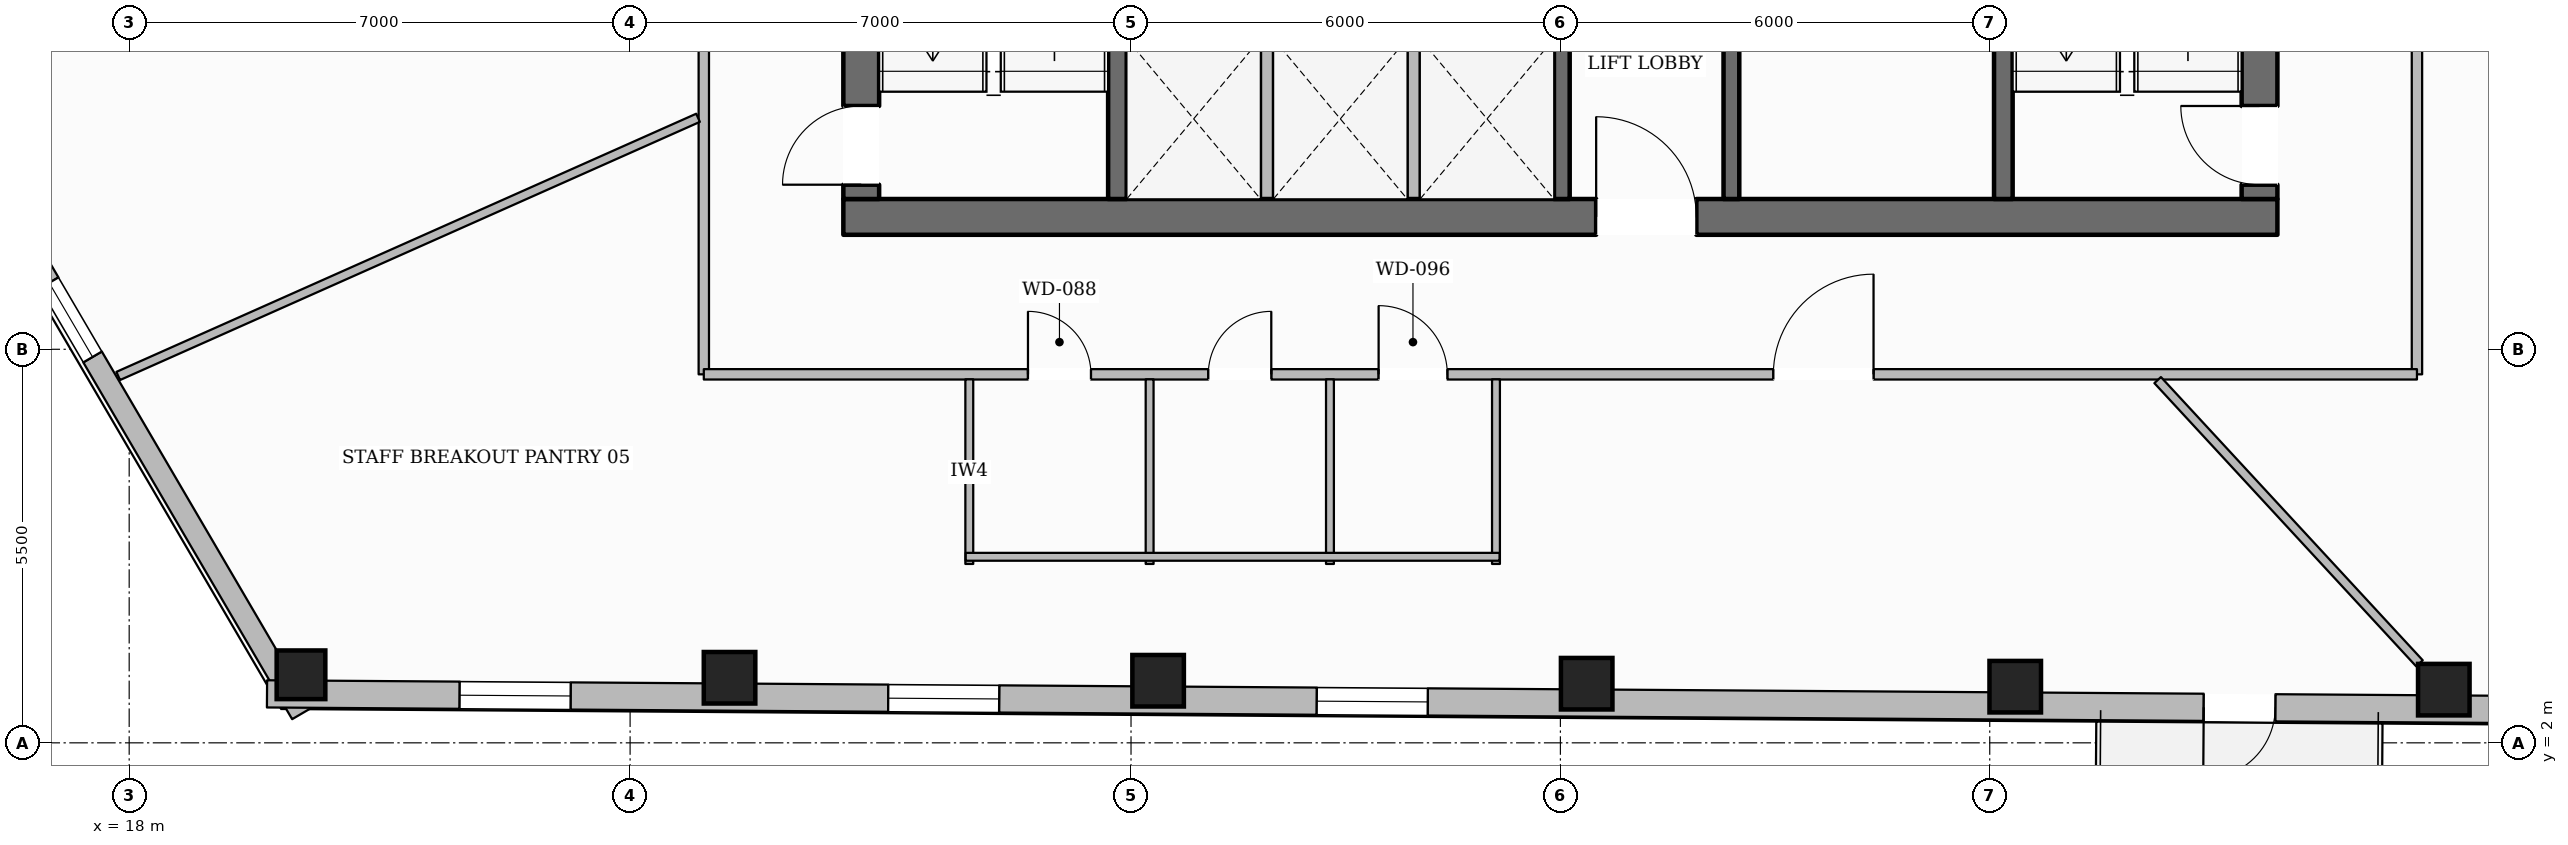
"""IFC4 building model, lengths in metres.
Left out: names, types, materials, properties, quantities, classifications, styles, units other than length and angle.
Written with IfcOpenShell. Run it as: python <this file> out.ifc"""

import sys

from ifc_helpers import new_model, si_unit, direction, frame, frame_2d, origin, origin_2d, place, context, subcontext, project, spatial, rectangle, hollow_rectangle, extrude, element, fill, save


model = new_model("IFC4")
c1 = context("Model", 3, precision=1e-05, world=origin(), true_north=direction((0.0, 1.0)))
c2 = subcontext(c1, "Body", "Model", "MODEL_VIEW")
j1 = project(units=[si_unit("LENGTHUNIT", "METRE"), si_unit("PLANEANGLEUNIT", "RADIAN")], contexts=[c1])
p1 = place(None, origin())
s1 = spatial("IfcSite", under=j1, at=p1, CompositionType="ELEMENT")
p2 = place(p1, origin())
s2 = spatial("IfcBuilding", under=s1, at=p2, CompositionType="ELEMENT")
p3 = place(p2, frame((0.0, 0.0, 120.15)))
s3 = spatial("IfcBuildingStorey", under=s2, at=p3, CompositionType="ELEMENT", Elevation=120.15)
p4 = place(p3, frame((27.98, 9.35, 0.0), z_axis=(0.0, 0.0, 1.0), x_axis=(1.0, 0.0, 0.0)))
e1 = element("IfcWall", 1, at=p4, inside=s3, PredefinedType="SOLIDWALL", context=c2, shape_type="SweptSolid", body=[
    extrude(rectangle(XDim=20.04, YDim=0.5, at=frame_2d((10.02, 0.0))), origin(), (0.0, 0.0, 1.0), 3.6),
])
p5 = place(p4, frame((10.52, 0.0, 0.0)))
e2 = element("IfcOpeningElement", 2, at=p5, cuts=e1, PredefinedType="OPENING", context=c2, shape_type="SweptSolid", body=[
    extrude(rectangle(XDim=1.4, YDim=2.2, at=frame_2d((0.7, 1.1))), frame((0.0, 0.26, 0.0), z_axis=(0.0, -1.0, 0.0), x_axis=(1.0, 0.0, 0.0)), (0.0, 0.0, 1.0), 0.52),
])
p6 = place(p3, frame((28.23, 9.6, 0.0), z_axis=(0.0, 0.0, 1.0), x_axis=(0.0, 1.0, 0.0)))
e3 = element("IfcWall", 3, at=p6, inside=s3, PredefinedType="SOLIDWALL", context=c2, shape_type="SweptSolid", body=[
    extrude(rectangle(XDim=13.0, YDim=0.5, at=frame_2d((6.5, 0.0))), origin(), (0.0, 0.0, 1.0), 3.6),
])
p7 = place(p6, frame((0.2, 0.0, 0.0)))
e4 = element("IfcOpeningElement", 4, at=p7, cuts=e3, PredefinedType="OPENING", context=c2, shape_type="SweptSolid", body=[
    extrude(rectangle(XDim=1.1, YDim=2.15, at=frame_2d((0.55, 1.075))), frame((0.0, 0.26, 0.0), z_axis=(0.0, -1.0, 0.0), x_axis=(1.0, 0.0, 0.0)), (0.0, 0.0, 1.0), 0.52),
])
p8 = place(p6, frame((8.4, 0.0, 0.0)))
e5 = element("IfcOpeningElement", 5, at=p8, cuts=e3, PredefinedType="OPENING", context=c2, shape_type="SweptSolid", body=[
    extrude(rectangle(XDim=0.9, YDim=2.1, at=frame_2d((0.45, 1.05))), frame((0.0, 0.26, 0.0), z_axis=(0.0, -1.0, 0.0), x_axis=(1.0, 0.0, 0.0)), (0.0, 0.0, 1.0), 0.52),
])
p9 = place(p3, frame((47.77, 9.6, 0.0), z_axis=(0.0, 0.0, 1.0), x_axis=(0.0, 1.0, 0.0)))
e6 = element("IfcWall", 6, at=p9, inside=s3, PredefinedType="SOLIDWALL", context=c2, shape_type="SweptSolid", body=[
    extrude(rectangle(XDim=13.0, YDim=0.5, at=frame_2d((6.5, 0.0))), origin(), (0.0, 0.0, 1.0), 3.6),
])
p10 = place(p9, frame((0.2, 0.0, 0.0)))
e7 = element("IfcOpeningElement", 7, at=p10, cuts=e6, PredefinedType="OPENING", context=c2, shape_type="SweptSolid", body=[
    extrude(rectangle(XDim=1.1, YDim=2.15, at=frame_2d((0.55, 1.075))), frame((0.0, 0.26, 0.0), z_axis=(0.0, -1.0, 0.0), x_axis=(1.0, 0.0, 0.0)), (0.0, 0.0, 1.0), 0.52),
])
p11 = place(p9, frame((8.4, 0.0, 0.0)))
e8 = element("IfcOpeningElement", 8, at=p11, cuts=e6, PredefinedType="OPENING", context=c2, shape_type="SweptSolid", body=[
    extrude(rectangle(XDim=0.9, YDim=2.1, at=frame_2d((0.45, 1.05))), frame((0.0, 0.26, 0.0), z_axis=(0.0, -1.0, 0.0), x_axis=(1.0, 0.0, 0.0)), (0.0, 0.0, 1.0), 0.52),
])
p12 = place(p3, frame((31.81, 9.6, 0.0), z_axis=(0.0, 0.0, 1.0), x_axis=(0.0, 1.0, 0.0)))
e9 = element("IfcWall", 9, at=p12, inside=s3, PredefinedType="SHEAR", context=c2, shape_type="SweptSolid", body=[
    extrude(rectangle(XDim=13.0, YDim=0.26, at=frame_2d((6.5, 0.0))), origin(), (0.0, 0.0, 1.0), 3.6),
])
p13 = place(p12, frame((10.925, 0.0, 0.0)))
e10 = element("IfcOpeningElement", 10, at=p13, cuts=e9, PredefinedType="OPENING", context=c2, shape_type="SweptSolid", body=[
    extrude(rectangle(XDim=1.25, YDim=2.25, at=frame_2d((0.625, 1.125))), frame((0.0, 0.14, 0.0), z_axis=(0.0, -1.0, 0.0), x_axis=(1.0, 0.0, 0.0)), (0.0, 0.0, 1.0), 0.28),
])
p14 = place(p3, frame((44.19, 9.6, 0.0), z_axis=(0.0, 0.0, 1.0), x_axis=(0.0, 1.0, 0.0)))
e11 = element("IfcWall", 11, at=p14, inside=s3, PredefinedType="SHEAR", context=c2, shape_type="SweptSolid", body=[
    extrude(rectangle(XDim=13.0, YDim=0.26, at=frame_2d((6.5, 0.0))), origin(), (0.0, 0.0, 1.0), 3.6),
])
p15 = place(p14, frame((10.925, 0.0, 0.0)))
e12 = element("IfcOpeningElement", 12, at=p15, cuts=e11, PredefinedType="OPENING", context=c2, shape_type="SweptSolid", body=[
    extrude(rectangle(XDim=1.25, YDim=2.25, at=frame_2d((0.625, 1.125))), frame((0.0, 0.14, 0.0), z_axis=(0.0, -1.0, 0.0), x_axis=(1.0, 0.0, 0.0)), (0.0, 0.0, 1.0), 0.28),
])
for number, where, z_axis, x_axis in (
    (13, (38.02, 9.6, 0.0), (0.0, 0.0, 1.0), (0.0, 1.0, 0.0)),
    (14, (40.39, 9.6, 0.0), (0.0, 0.0, 1.0), (0.0, 1.0, 0.0)),
):
    element("IfcWall", number, at=place(p3, frame(where, z_axis=z_axis, x_axis=x_axis)), inside=s3, PredefinedType="SOLIDWALL", context=c2, shape_type="SweptSolid", body=[
        extrude(rectangle(XDim=2.24, YDim=0.22, at=frame_2d((1.12, 0.0))), origin(), (0.0, 0.0, 1.0), 3.6),
    ])
p16 = place(p3, frame((20.401, 2.951, 0.0), z_axis=(0.0, 0.0, 1.0), x_axis=(1.0, 0.0, 0.0)))
e15 = element("IfcColumn", 15, at=p16, inside=s3, PredefinedType="COLUMN", context=c2, shape_type="SweptSolid", body=[
    extrude(hollow_rectangle(XDim=0.68, YDim=0.68, WallThickness=0.03, at=origin_2d()), origin(), (0.0, 0.0, 1.0), 3.6),
])
for number, where, z_axis, x_axis in (
    (16, (26.39, 2.909, 0.0), (0.0, 0.0, 1.0), (1.0, 0.0, 0.0)),
    (17, (32.379, 2.868, 0.0), (0.0, 0.0, 1.0), (1.0, 0.0, 0.0)),
    (18, (38.367, 2.826, 0.0), (0.0, 0.0, 1.0), (1.0, 0.0, 0.0)),
    (19, (44.356, 2.785, 0.0), (0.0, 0.0, 1.0), (1.0, 0.0, 0.0)),
    (20, (50.345, 2.743, 0.0), (0.0, 0.0, 1.0), (1.0, 0.0, 0.0)),
):
    element("IfcColumn", number, at=place(p3, frame(where, z_axis=z_axis, x_axis=x_axis)), inside=s3, PredefinedType="COLUMN", context=c2, shape_type="SweptSolid", body=[
        extrude(hollow_rectangle(XDim=0.72, YDim=0.72, WallThickness=0.032, at=origin_2d()), origin(), (0.0, 0.0, 1.0), 3.6),
    ])
p17 = place(p3, frame((20.407, 2.406, 0.0), z_axis=(0.0, 0.0, 1.0), x_axis=(-0.505148604042, 0.863032379366, 0.0)))
e21 = element("IfcWall", 21, at=p17, inside=s3, PredefinedType="STANDARD", context=c2, shape_type="SweptSolid", body=[
    extrude(rectangle(XDim=12.755, YDim=0.3, at=frame_2d((6.378, 0.0))), origin(), (0.0, 0.0, 1.0), 3.059),
])
p18 = place(p17, frame((5.778, 0.0, 0.65)))
e22 = element("IfcOpeningElement", 22, at=p18, cuts=e21, PredefinedType="OPENING", context=c2, shape_type="SweptSolid", body=[
    extrude(rectangle(XDim=1.2, YDim=1.7, at=frame_2d((0.6, 0.85))), frame((0.0, 0.16, 0.0), z_axis=(0.0, -1.0, 0.0), x_axis=(1.0, 0.0, 0.0)), (0.0, 0.0, 1.0), 0.32),
])
p19 = place(p3, frame((56.812, 2.428, 0.0), z_axis=(0.0, 0.0, 1.0), x_axis=(-0.999975943084, 0.006936371743, 0.0)))
e23 = element("IfcWall", 23, at=p19, inside=s3, PredefinedType="STANDARD", context=c2, shape_type="SweptSolid", body=[
    extrude(rectangle(XDim=36.887, YDim=0.38, at=frame_2d((18.443, 0.0))), origin(), (0.0, 0.0, 1.0), 3.059),
])
p20 = place(p19, frame((8.822, 0.0, 0.0)))
e24 = element("IfcOpeningElement", 24, at=p20, cuts=e23, PredefinedType="OPENING", context=c2, shape_type="SweptSolid", body=[
    extrude(rectangle(XDim=1.0, YDim=2.2, at=frame_2d((0.5, 1.1))), frame((0.0, 0.2, 0.0), z_axis=(0.0, -1.0, 0.0), x_axis=(1.0, 0.0, 0.0)), (0.0, 0.0, 1.0), 0.4),
])
p21 = place(p19, frame((32.644, 0.0, 0.65)))
e25 = element("IfcOpeningElement", 25, at=p21, cuts=e23, PredefinedType="OPENING", context=c2, shape_type="SweptSolid", body=[
    extrude(rectangle(XDim=1.55, YDim=1.75, at=frame_2d((0.775, 0.875))), frame((0.0, 0.2, 0.0), z_axis=(0.0, -1.0, 0.0), x_axis=(1.0, 0.0, 0.0)), (0.0, 0.0, 1.0), 0.4),
])
p22 = place(p19, frame((26.655, 0.0, 0.65)))
e26 = element("IfcOpeningElement", 26, at=p22, cuts=e23, PredefinedType="OPENING", context=c2, shape_type="SweptSolid", body=[
    extrude(rectangle(XDim=1.55, YDim=1.75, at=frame_2d((0.775, 0.875))), frame((0.0, 0.2, 0.0), z_axis=(0.0, -1.0, 0.0), x_axis=(1.0, 0.0, 0.0)), (0.0, 0.0, 1.0), 0.4),
])
p23 = place(p19, frame((20.666, 0.0, 0.65)))
e27 = element("IfcOpeningElement", 27, at=p23, cuts=e23, PredefinedType="OPENING", context=c2, shape_type="SweptSolid", body=[
    extrude(rectangle(XDim=1.55, YDim=1.75, at=frame_2d((0.775, 0.875))), frame((0.0, 0.2, 0.0), z_axis=(0.0, -1.0, 0.0), x_axis=(1.0, 0.0, 0.0)), (0.0, 0.0, 1.0), 0.4),
])
p24 = place(p19, frame((2.699, 0.0, 0.65)))
e28 = element("IfcOpeningElement", 28, at=p24, cuts=e23, PredefinedType="OPENING", context=c2, shape_type="SweptSolid", body=[
    extrude(rectangle(XDim=1.55, YDim=1.75, at=frame_2d((0.775, 0.875))), frame((0.0, 0.2, 0.0), z_axis=(0.0, -1.0, 0.0), x_axis=(1.0, 0.0, 0.0)), (0.0, 0.0, 1.0), 0.4),
])
for number, where, z_axis, x_axis in (
    (29, (33.9, 9.55, 0.0), (0.0, 0.0, 1.0), (0.0, 1.0, 0.0)),
    (30, (35.95, 9.55, 0.0), (0.0, 0.0, 1.0), (0.0, 1.0, 0.0)),
):
    element("IfcWall", number, at=place(p3, frame(where, z_axis=z_axis, x_axis=x_axis)), inside=s3, PredefinedType="PARTITIONING", context=c2, shape_type="SweptSolid", body=[
        extrude(rectangle(XDim=2.29, YDim=0.165, at=frame_2d((1.145, 0.0))), origin(), (0.0, 0.0, 1.0), 3.6),
    ])
p25 = place(p3, frame((49.97, 7.15, 0.0), z_axis=(0.0, 0.0, 1.0), x_axis=(0.0, 1.0, 0.0)))
e31 = element("IfcWall", 31, at=p25, inside=s3, PredefinedType="PARTITIONING", context=c2, shape_type="SweptSolid", body=[
    extrude(rectangle(XDim=17.9, YDim=0.145, at=frame_2d((8.95, 0.0))), origin(), (0.0, 0.0, 1.0), 3.288),
])
p26 = place(p25, frame((6.208, 0.0, 0.0)))
e32 = element("IfcOpeningElement", 32, at=p26, cuts=e31, PredefinedType="OPENING", context=c2, shape_type="SweptSolid", body=[
    extrude(rectangle(XDim=1.4, YDim=2.2, at=frame_2d((0.7, 1.1))), frame((0.0, 0.083, 0.0), z_axis=(0.0, -1.0, 0.0), x_axis=(1.0, 0.0, 0.0)), (0.0, 0.0, 1.0), 0.165),
])
p27 = place(p3, frame((26.03, 25.05, 0.0), z_axis=(0.0, 0.0, 1.0), x_axis=(0.0, -1.0, 0.0)))
e33 = element("IfcWall", 33, at=p27, inside=s3, PredefinedType="PARTITIONING", context=c2, shape_type="SweptSolid", body=[
    extrude(rectangle(XDim=17.9, YDim=0.145, at=frame_2d((8.95, 0.0))), origin(), (0.0, 0.0, 1.0), 3.288),
])
p28 = place(p27, frame((8.438, 0.0, 0.0)))
e34 = element("IfcOpeningElement", 34, at=p28, cuts=e33, PredefinedType="OPENING", context=c2, shape_type="SweptSolid", body=[
    extrude(rectangle(XDim=1.4, YDim=2.2, at=frame_2d((0.7, 1.1))), frame((0.0, 0.083, 0.0), z_axis=(0.0, -1.0, 0.0), x_axis=(1.0, 0.0, 0.0)), (0.0, 0.0, 1.0), 0.165),
])
p29 = place(p3, frame((26.03, 7.15, 0.0), z_axis=(0.0, 0.0, 1.0), x_axis=(1.0, 0.0, 0.0)))
e35 = element("IfcWall", 35, at=p29, inside=s3, PredefinedType="PARTITIONING", context=c2, shape_type="SweptSolid", body=[
    extrude(rectangle(XDim=23.94, YDim=0.145, at=frame_2d((11.97, 0.0))), origin(), (0.0, 0.0, 1.0), 3.6),
])
p30 = place(p29, frame((4.53, 0.0, 0.0)))
e36 = element("IfcOpeningElement", 36, at=p30, cuts=e35, PredefinedType="OPENING", context=c2, shape_type="SweptSolid", body=[
    extrude(rectangle(XDim=0.88, YDim=2.1, at=frame_2d((0.44, 1.05))), frame((0.0, 0.083, 0.0), z_axis=(0.0, -1.0, 0.0), x_axis=(1.0, 0.0, 0.0)), (0.0, 0.0, 1.0), 0.165),
])
p31 = place(p29, frame((7.05, 0.0, 0.0)))
e37 = element("IfcOpeningElement", 37, at=p31, cuts=e35, PredefinedType="OPENING", context=c2, shape_type="SweptSolid", body=[
    extrude(rectangle(XDim=0.88, YDim=2.1, at=frame_2d((0.44, 1.05))), frame((0.0, 0.083, 0.0), z_axis=(0.0, -1.0, 0.0), x_axis=(1.0, 0.0, 0.0)), (0.0, 0.0, 1.0), 0.165),
])
p32 = place(p29, frame((9.43, 0.0, 0.0)))
e38 = element("IfcOpeningElement", 38, at=p32, cuts=e35, PredefinedType="OPENING", context=c2, shape_type="SweptSolid", body=[
    extrude(rectangle(XDim=0.96, YDim=2.1, at=frame_2d((0.48, 1.05))), frame((0.0, 0.083, 0.0), z_axis=(0.0, -1.0, 0.0), x_axis=(1.0, 0.0, 0.0)), (0.0, 0.0, 1.0), 0.165),
])
p33 = place(p29, frame((14.946, 0.0, 0.0)))
e39 = element("IfcOpeningElement", 39, at=p33, cuts=e35, PredefinedType="OPENING", context=c2, shape_type="SweptSolid", body=[
    extrude(rectangle(XDim=1.4, YDim=2.2, at=frame_2d((0.7, 1.1))), frame((0.0, 0.083, 0.0), z_axis=(0.0, -1.0, 0.0), x_axis=(1.0, 0.0, 0.0)), (0.0, 0.0, 1.0), 0.165),
])
p34 = place(p3, frame((29.74, 4.5, 0.0), z_axis=(0.0, 0.0, 1.0), x_axis=(0.0, 1.0, 0.0)))
e40 = element("IfcWall", 40, at=p34, inside=s3, PredefinedType="PLUMBINGWALL", context=c2, shape_type="SweptSolid", body=[
    extrude(rectangle(XDim=2.58, YDim=0.11, at=frame_2d((1.29, 0.0))), origin(), (0.0, 0.0, 1.0), 3.6),
])
p35 = place(p3, frame((32.26, 4.5, 0.0), z_axis=(0.0, 0.0, 1.0), x_axis=(0.0, 1.0, 0.0)))
e41 = element("IfcWall", 41, at=p35, inside=s3, PredefinedType="PLUMBINGWALL", context=c2, shape_type="SweptSolid", body=[
    extrude(rectangle(XDim=2.58, YDim=0.11, at=frame_2d((1.29, 0.0))), origin(), (0.0, 0.0, 1.0), 3.141),
])
for number, where, z_axis, x_axis in (
    (42, (34.78, 4.5, 0.0), (0.0, 0.0, 1.0), (0.0, 1.0, 0.0)),
    (43, (37.1, 4.5, 0.0), (0.0, 0.0, 1.0), (0.0, 1.0, 0.0)),
):
    element("IfcWall", number, at=place(p3, frame(where, z_axis=z_axis, x_axis=x_axis)), inside=s3, PredefinedType="PLUMBINGWALL", context=c2, shape_type="SweptSolid", body=[
        extrude(rectangle(XDim=2.58, YDim=0.11, at=frame_2d((1.29, 0.0))), origin(), (0.0, 0.0, 1.0), 3.6),
    ])
p36 = place(p3, frame((29.69, 4.6, 0.0), z_axis=(0.0, 0.0, 1.0), x_axis=(1.0, 0.0, 0.0)))
e44 = element("IfcWall", 44, at=p36, inside=s3, PredefinedType="PLUMBINGWALL", context=c2, shape_type="SweptSolid", body=[
    extrude(rectangle(XDim=7.46, YDim=0.11, at=frame_2d((3.73, 0.0))), origin(), (0.0, 0.0, 1.0), 3.6),
])
p37 = place(p3, frame((25.949, 10.735, 0.0), z_axis=(0.0, 0.0, 1.0), x_axis=(-0.913542336497, -0.406743653211, 0.0)))
e45 = element("IfcWall", 45, at=p37, inside=s3, PredefinedType="PARTITIONING", context=c2, shape_type="SweptSolid", body=[
    extrude(rectangle(XDim=8.87, YDim=0.125, at=frame_2d((4.435, 0.0))), origin(), (0.0, 0.0, 1.0), 3.6),
])
p38 = place(p3, frame((46.347, 7.07, 0.0), z_axis=(0.0, 0.0, 1.0), x_axis=(0.678748401089, -0.734370892683, 0.0)))
e46 = element("IfcWall", 46, at=p38, inside=s3, PredefinedType="PARTITIONING", context=c2, shape_type="SweptSolid", body=[
    extrude(rectangle(XDim=5.39, YDim=0.125, at=frame_2d((2.695, 0.0))), origin(), (0.0, 0.0, 1.0), 3.6),
])
p39 = place(p20, origin())
e47 = element("IfcDoor", 47, at=p39, inside=s3, OperationType="SINGLE_SWING_RIGHT", PredefinedType="DOOR", context=c2, shape_type="SweptSolid", body=[
    extrude(rectangle(XDim=1.0, YDim=2.2, at=frame_2d((0.5, 1.1))), frame((0.0, 0.025, 0.0), z_axis=(0.0, -1.0, 0.0), x_axis=(1.0, 0.0, 0.0)), (0.0, 0.0, 1.0), 0.05),
])
fill(e24, e47)
p40 = place(p21, origin())
e48 = element("IfcWindow", 48, at=p40, inside=s3, PartitioningType="SINGLE_PANEL", PredefinedType="WINDOW", context=c2, shape_type="SweptSolid", body=[
    extrude(rectangle(XDim=1.55, YDim=1.75, at=frame_2d((0.775, 0.875))), frame((0.0, 0.03, 0.0), z_axis=(0.0, -1.0, 0.0), x_axis=(1.0, 0.0, 0.0)), (0.0, 0.0, 1.0), 0.06),
])
fill(e25, e48)
p41 = place(p22, origin())
e49 = element("IfcWindow", 49, at=p41, inside=s3, PartitioningType="SINGLE_PANEL", PredefinedType="WINDOW", context=c2, shape_type="SweptSolid", body=[
    extrude(rectangle(XDim=1.55, YDim=1.75, at=frame_2d((0.775, 0.875))), frame((0.0, 0.03, 0.0), z_axis=(0.0, -1.0, 0.0), x_axis=(1.0, 0.0, 0.0)), (0.0, 0.0, 1.0), 0.06),
])
fill(e26, e49)
p42 = place(p23, origin())
e50 = element("IfcWindow", 50, at=p42, inside=s3, PartitioningType="SINGLE_PANEL", PredefinedType="WINDOW", context=c2, shape_type="SweptSolid", body=[
    extrude(rectangle(XDim=1.55, YDim=1.75, at=frame_2d((0.775, 0.875))), frame((0.0, 0.03, 0.0), z_axis=(0.0, -1.0, 0.0), x_axis=(1.0, 0.0, 0.0)), (0.0, 0.0, 1.0), 0.06),
])
fill(e27, e50)
p43 = place(p18, origin())
e51 = element("IfcWindow", 51, at=p43, inside=s3, PartitioningType="SINGLE_PANEL", PredefinedType="WINDOW", context=c2, shape_type="SweptSolid", body=[
    extrude(rectangle(XDim=1.2, YDim=1.7, at=frame_2d((0.6, 0.85))), frame((0.0, 0.03, 0.0), z_axis=(0.0, -1.0, 0.0), x_axis=(1.0, 0.0, 0.0)), (0.0, 0.0, 1.0), 0.06),
])
fill(e22, e51)
p44 = place(p7, origin())
e52 = element("IfcDoor", 52, at=p44, inside=s3, OperationType="SINGLE_SWING_LEFT", PredefinedType="DOOR", context=c2, shape_type="SweptSolid", body=[
    extrude(rectangle(XDim=1.1, YDim=2.15, at=frame_2d((0.55, 1.075))), frame((0.0, 0.025, 0.0), z_axis=(0.0, -1.0, 0.0), x_axis=(1.0, 0.0, 0.0)), (0.0, 0.0, 1.0), 0.05),
])
fill(e4, e52)
p45 = place(p10, origin())
e53 = element("IfcDoor", 53, at=p45, inside=s3, OperationType="SINGLE_SWING_RIGHT", PredefinedType="DOOR", context=c2, shape_type="SweptSolid", body=[
    extrude(rectangle(XDim=1.1, YDim=2.15, at=frame_2d((0.55, 1.075))), frame((0.0, 0.025, 0.0), z_axis=(0.0, -1.0, 0.0), x_axis=(1.0, 0.0, 0.0)), (0.0, 0.0, 1.0), 0.05),
])
fill(e7, e53)
p46 = place(p5, origin())
e54 = element("IfcDoor", 54, at=p46, inside=s3, OperationType="SINGLE_SWING_LEFT", PredefinedType="DOOR", context=c2, shape_type="SweptSolid", body=[
    extrude(rectangle(XDim=1.4, YDim=2.2, at=frame_2d((0.7, 1.1))), frame((0.0, 0.025, 0.0), z_axis=(0.0, -1.0, 0.0), x_axis=(1.0, 0.0, 0.0)), (0.0, 0.0, 1.0), 0.05),
])
fill(e2, e54)
p47 = place(p30, origin())
e55 = element("IfcDoor", 55, at=p47, inside=s3, OperationType="SINGLE_SWING_LEFT", PredefinedType="DOOR", context=c2, shape_type="SweptSolid", body=[
    extrude(rectangle(XDim=0.88, YDim=2.1, at=frame_2d((0.44, 1.05))), frame((0.0, 0.025, 0.0), z_axis=(0.0, -1.0, 0.0), x_axis=(1.0, 0.0, 0.0)), (0.0, 0.0, 1.0), 0.05),
])
fill(e36, e55)
p48 = place(p31, origin())
e56 = element("IfcDoor", 56, at=p48, inside=s3, OperationType="SINGLE_SWING_RIGHT", PredefinedType="DOOR", context=c2, shape_type="SweptSolid", body=[
    extrude(rectangle(XDim=0.88, YDim=2.1, at=frame_2d((0.44, 1.05))), frame((0.0, 0.025, 0.0), z_axis=(0.0, -1.0, 0.0), x_axis=(1.0, 0.0, 0.0)), (0.0, 0.0, 1.0), 0.05),
])
fill(e37, e56)
p49 = place(p32, origin())
e57 = element("IfcDoor", 57, at=p49, inside=s3, OperationType="SINGLE_SWING_LEFT", PredefinedType="DOOR", context=c2, shape_type="SweptSolid", body=[
    extrude(rectangle(XDim=0.96, YDim=2.1, at=frame_2d((0.48, 1.05))), frame((0.0, 0.025, 0.0), z_axis=(0.0, -1.0, 0.0), x_axis=(1.0, 0.0, 0.0)), (0.0, 0.0, 1.0), 0.05),
])
fill(e38, e57)
p50 = place(p33, origin())
e58 = element("IfcDoor", 58, at=p50, inside=s3, OperationType="SINGLE_SWING_RIGHT", PredefinedType="DOOR", context=c2, shape_type="SweptSolid", body=[
    extrude(rectangle(XDim=1.4, YDim=2.2, at=frame_2d((0.7, 1.1))), frame((0.0, 0.025, 0.0), z_axis=(0.0, -1.0, 0.0), x_axis=(1.0, 0.0, 0.0)), (0.0, 0.0, 1.0), 0.05),
])
fill(e39, e58)
save(model, sys.argv[1])
